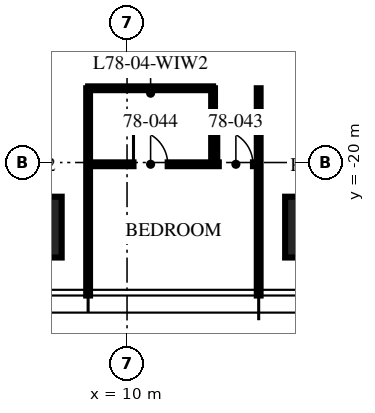
"""IFC4 building model, lengths in metres.
Left out: names, types, materials, properties, quantities, classifications, styles, units other than length and angle.
Written with IfcOpenShell. Run it as: python <this file> out.ifc"""

import sys

from ifc_helpers import new_model, si_unit, direction, frame, frame_2d, origin, origin_2d, place, context, subcontext, project, spatial, rectangle, extrude, element, fill, save


model = new_model("IFC4")
c1 = context("Model", 3, precision=1e-05, world=origin(), true_north=direction((0.0, 1.0)))
c2 = subcontext(c1, "Body", "Model", "MODEL_VIEW")
j1 = project(units=[si_unit("LENGTHUNIT", "METRE"), si_unit("PLANEANGLEUNIT", "RADIAN")], contexts=[c1])
p1 = place(None, origin())
s1 = spatial("IfcSite", under=j1, at=p1, CompositionType="ELEMENT")
p2 = place(p1, origin())
s2 = spatial("IfcBuilding", under=s1, at=p2, CompositionType="ELEMENT")
p3 = place(p2, frame((0.0, 0.0, 312.0)))
s3 = spatial("IfcBuildingStorey", under=s2, at=p3, CompositionType="ELEMENT", Elevation=312.0)
for number, where, z_axis, x_axis in (
    (1, (14.96, -21.7, 0.0), (0.0, 0.0, 1.0), (1.0, 0.0, 0.0)),
    (2, (7.48, -21.7, 0.0), (0.0, 0.0, 1.0), (1.0, 0.0, 0.0)),
):
    element("IfcColumn", number, at=place(p3, frame(where, z_axis=z_axis, x_axis=x_axis)), inside=s3, PredefinedType="COLUMN", context=c2, shape_type="SweptSolid", body=[
        extrude(rectangle(XDim=1.6, YDim=1.6, at=origin_2d()), origin(), (0.0, 0.0, 1.0), 3.75),
    ])
for number, where, z_axis, x_axis in (
    (3, (8.976, -18.046, 0.0), (0.0, 0.0, 1.0), (0.0, -1.0, 0.0)),
    (4, (13.464, -18.046, 0.0), (0.0, 0.0, 1.0), (0.0, -1.0, 0.0)),
):
    element("IfcWall", number, at=place(p3, frame(where, z_axis=z_axis, x_axis=x_axis)), inside=s3, PredefinedType="PARTITIONING", context=c2, shape_type="SweptSolid", body=[
        extrude(rectangle(XDim=5.454, YDim=0.1, at=frame_2d((2.727, 0.0))), origin(), (0.0, 0.0, 1.0), 3.01),
    ])
p4 = place(p3, frame((8.976, -20.046, 0.0), z_axis=(0.0, 0.0, 1.0), x_axis=(1.0, 0.0, 0.0)))
e5 = element("IfcWall", 5, at=p4, inside=s3, PredefinedType="PARTITIONING", context=c2, shape_type="SweptSolid", body=[
    extrude(rectangle(XDim=4.488, YDim=0.1, at=frame_2d((2.244, 0.0))), origin(), (0.0, 0.0, 1.0), 2.91),
])
p5 = place(p4, frame((3.438, 0.0, 0.0)))
e6 = element("IfcOpeningElement", 6, at=p5, cuts=e5, PredefinedType="OPENING", context=c2, shape_type="SweptSolid", body=[
    extrude(rectangle(XDim=0.9, YDim=2.1, at=frame_2d((0.45, 1.05))), frame((0.0, 0.06, 0.0), z_axis=(0.0, -1.0, 0.0), x_axis=(1.0, 0.0, 0.0)), (0.0, 0.0, 1.0), 0.12),
])
p6 = place(p4, frame((1.194, 0.0, 0.0)))
e7 = element("IfcOpeningElement", 7, at=p6, cuts=e5, PredefinedType="OPENING", context=c2, shape_type="SweptSolid", body=[
    extrude(rectangle(XDim=0.9, YDim=2.1, at=frame_2d((0.45, 1.05))), frame((0.0, 0.06, 0.0), z_axis=(0.0, -1.0, 0.0), x_axis=(1.0, 0.0, 0.0)), (0.0, 0.0, 1.0), 0.12),
])
p7 = place(p3, frame((12.264, -18.046, 0.0), z_axis=(0.0, 0.0, 1.0), x_axis=(0.0, -1.0, 0.0)))
e8 = element("IfcWall", 8, at=p7, inside=s3, PredefinedType="PARTITIONING", context=c2, shape_type="SweptSolid", body=[
    extrude(rectangle(XDim=2.0, YDim=0.1, at=frame_2d((1.0, 0.0))), origin(), (0.0, 0.0, 1.0), 3.5),
])
p8 = place(p3, frame((8.976, -18.046, 0.0), z_axis=(0.0, 0.0, 1.0), x_axis=(1.0, 0.0, 0.0)))
e9 = element("IfcWall", 9, at=p8, inside=s3, PredefinedType="PARTITIONING", context=c2, shape_type="SweptSolid", body=[
    extrude(rectangle(XDim=3.288, YDim=0.1, at=frame_2d((1.644, 0.0))), origin(), (0.0, 0.0, 1.0), 2.91),
])
p9 = place(p5, origin())
e10 = element("IfcDoor", 10, at=p9, inside=s3, OperationType="SINGLE_SWING_LEFT", PredefinedType="DOOR", context=c2, shape_type="SweptSolid", body=[
    extrude(rectangle(XDim=0.9, YDim=2.1, at=frame_2d((0.45, 1.05))), frame((0.0, 0.025, 0.0), z_axis=(0.0, -1.0, 0.0), x_axis=(1.0, 0.0, 0.0)), (0.0, 0.0, 1.0), 0.05),
])
fill(e6, e10)
p10 = place(p6, origin())
e11 = element("IfcDoor", 11, at=p10, inside=s3, OperationType="SINGLE_SWING_LEFT", PredefinedType="DOOR", context=c2, shape_type="SweptSolid", body=[
    extrude(rectangle(XDim=0.9, YDim=2.1, at=frame_2d((0.45, 1.05))), frame((0.0, 0.025, 0.0), z_axis=(0.0, -1.0, 0.0), x_axis=(1.0, 0.0, 0.0)), (0.0, 0.0, 1.0), 0.05),
])
fill(e7, e11)
save(model, sys.argv[1])
